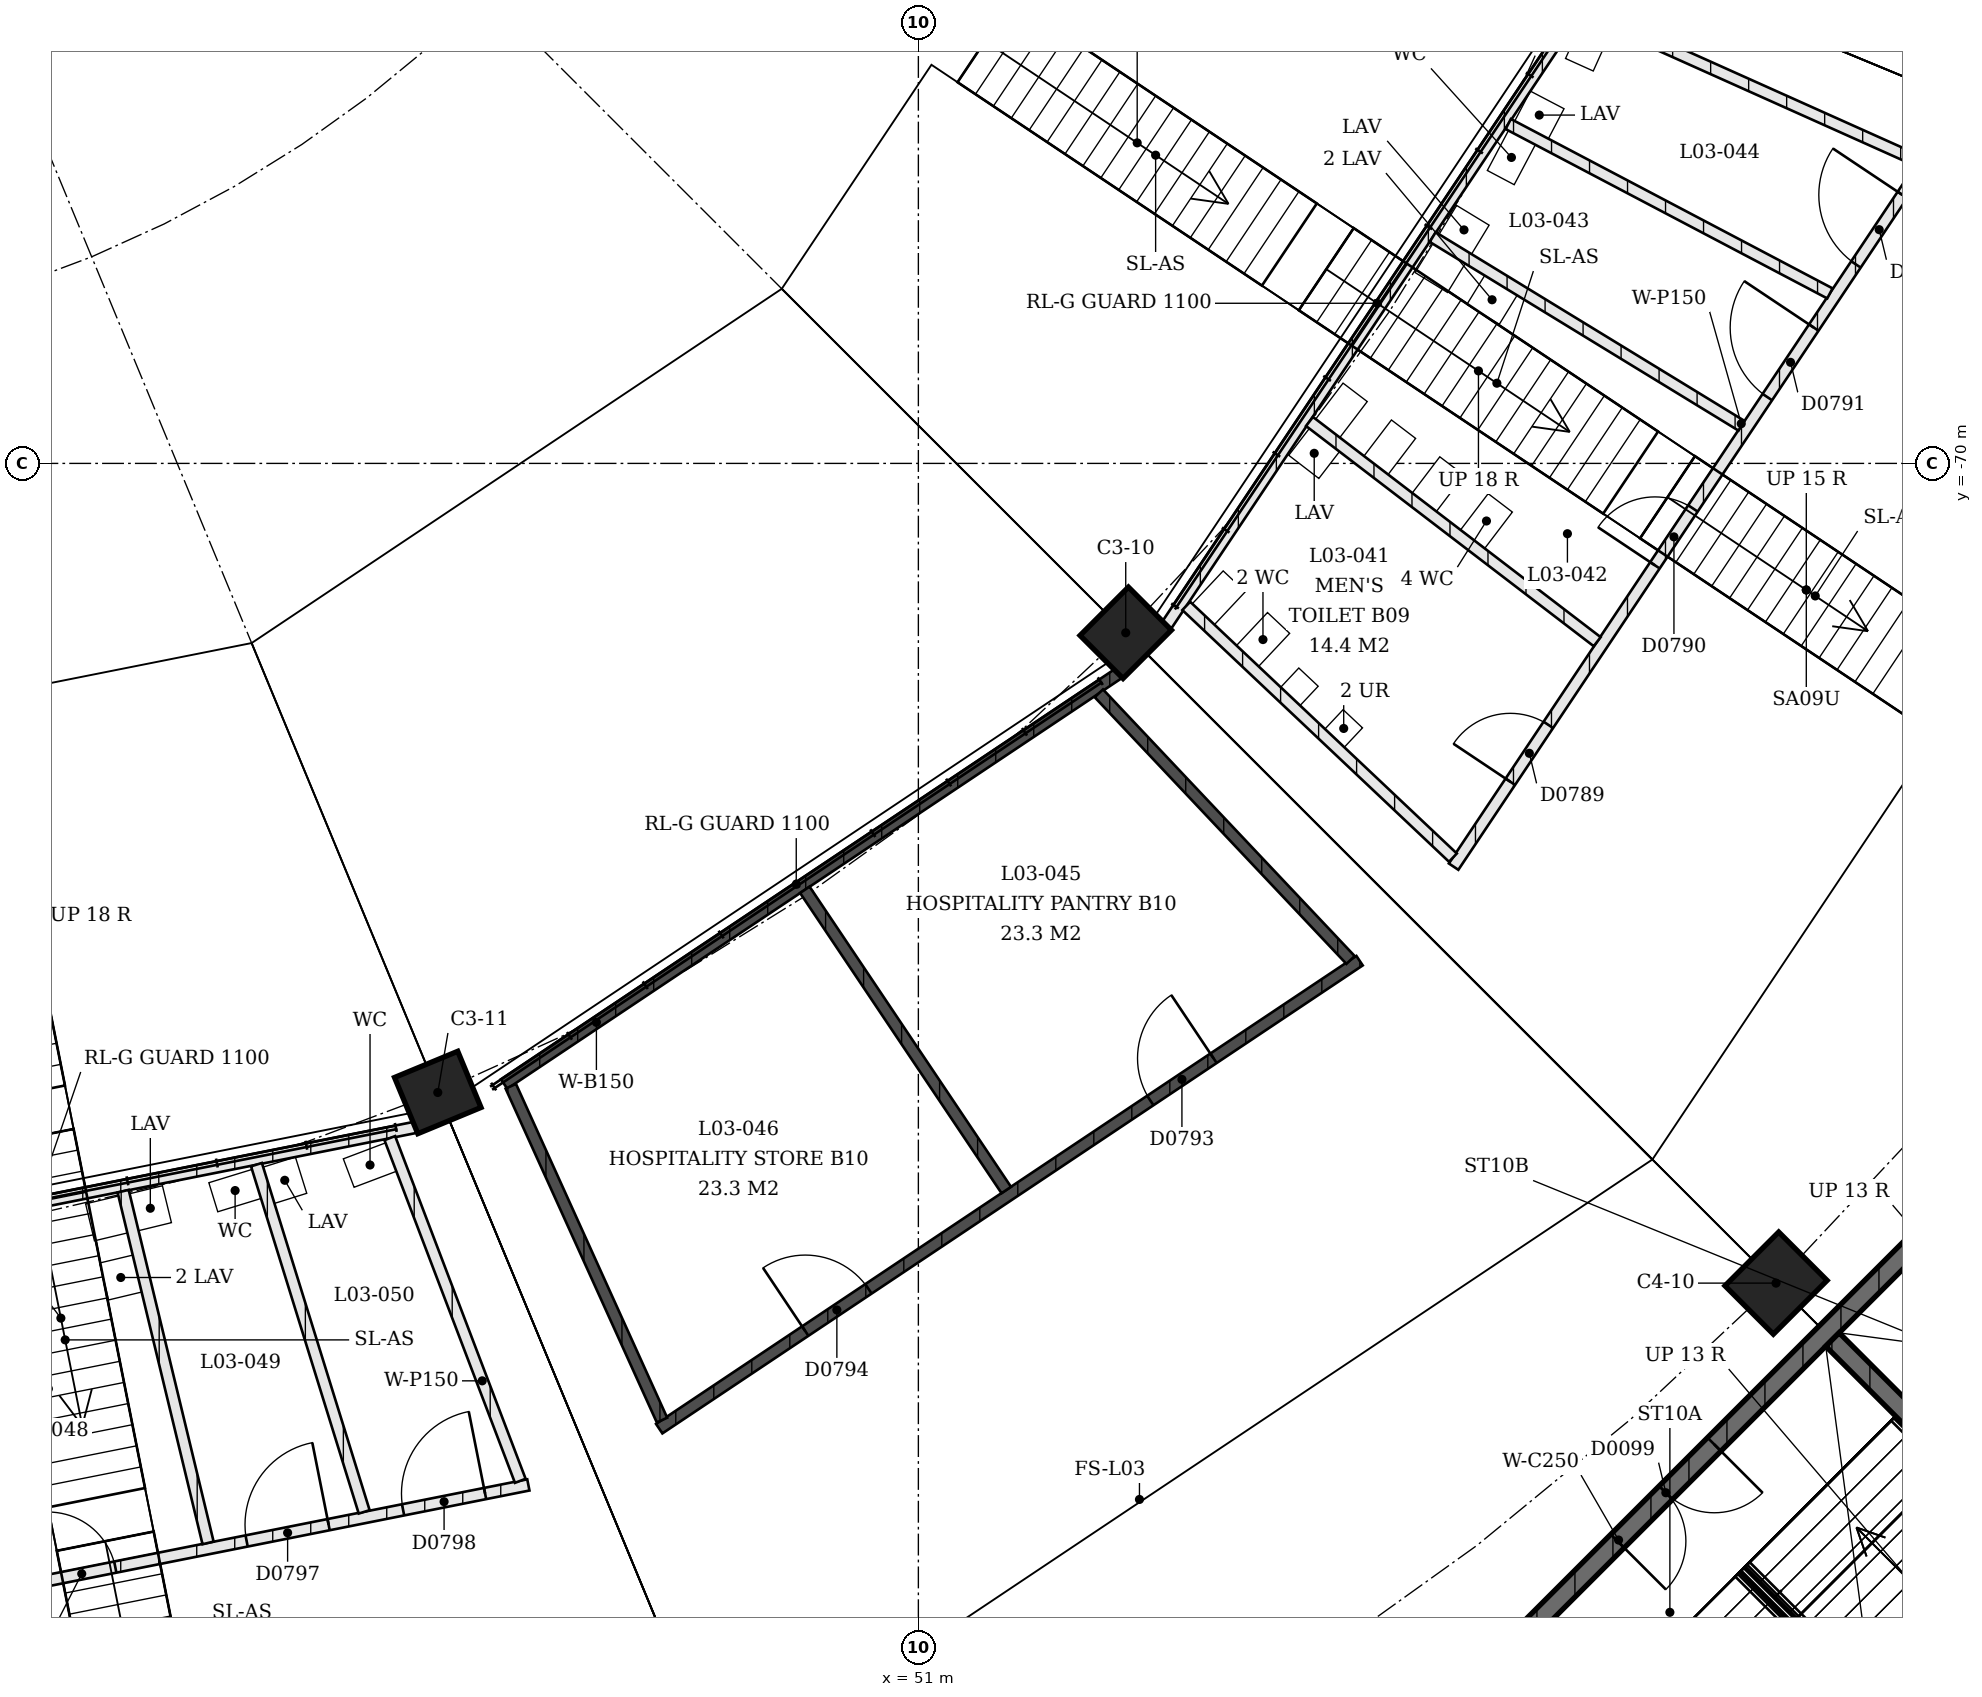
"""IFC4 building model, lengths in metres.
Left out: names, types, materials, properties, quantities, classifications, styles, units other than length and angle.
Written with IfcOpenShell. Run it as: python <this file> out.ifc"""

import sys

from ifc_helpers import new_model, si_unit, direction, frame, frame_2d, origin, origin_2d, place, context, subcontext, project, spatial, rectangle, extrude, element, fill, save


model = new_model("IFC4")
c1 = context("Model", 3, precision=1e-05, world=origin(), true_north=direction((0.0, 1.0)))
c2 = subcontext(c1, "Body", "Model", "MODEL_VIEW")
j1 = project(units=[si_unit("LENGTHUNIT", "METRE"), si_unit("PLANEANGLEUNIT", "RADIAN")], contexts=[c1])
p1 = place(None, origin())
s1 = spatial("IfcSite", under=j1, at=p1, CompositionType="ELEMENT")
p2 = place(p1, origin())
s2 = spatial("IfcBuilding", under=s1, at=p2, CompositionType="ELEMENT")
p3 = place(p2, frame((0.0, 0.0, 13.5)))
s3 = spatial("IfcBuildingStorey", under=s2, at=p3, CompositionType="ELEMENT", Elevation=13.5)
p4 = place(p3, frame((53.728, -72.228, 0.0), z_axis=(0.0, 0.0, 1.0), x_axis=(0.707106781187, 0.707106781187, 0.0)))
e1 = element("IfcColumn", 1, at=p4, inside=s3, PredefinedType="COLUMN", context=c2, shape_type="SweptSolid", body=[
    extrude(rectangle(XDim=0.9, YDim=0.8, at=origin_2d()), origin(), (0.0, 0.0, 1.0), 2.033),
])
p5 = place(p3, frame((62.284, -80.784, 0.0), z_axis=(0.0, 0.0, 1.0), x_axis=(0.707106781187, 0.707106781187, 0.0)))
e2 = element("IfcColumn", 2, at=p5, inside=s3, PredefinedType="COLUMN", context=c2, shape_type="SweptSolid", body=[
    extrude(rectangle(XDim=1.0, YDim=0.9, at=origin_2d()), origin(), (0.0, 0.0, 1.0), 4.5),
])
p6 = place(p3, frame((44.677, -78.276, 0.0), z_axis=(0.0, 0.0, 1.0), x_axis=(0.923879532511, 0.382683432365, 0.0)))
e3 = element("IfcColumn", 3, at=p6, inside=s3, PredefinedType="COLUMN", context=c2, shape_type="SweptSolid", body=[
    extrude(rectangle(XDim=0.9, YDim=0.8, at=origin_2d()), origin(), (0.0, 0.0, 1.0), 2.033),
])
p7 = place(p3, frame((58.643, -85.734, 0.0), z_axis=(0.0, 0.0, 1.0), x_axis=(0.707106781187, 0.707106781187, 0.0)))
e4 = element("IfcWall", 4, at=p7, inside=s3, PredefinedType="SHEAR", context=c2, shape_type="SweptSolid", body=[
    extrude(rectangle(XDim=12.15, YDim=0.25, at=frame_2d((6.075, 0.0))), origin(), (0.0, 0.0, 1.0), 4.09),
])
p8 = place(p7, frame((2.2, 0.0, 0.0)))
e5 = element("IfcOpeningElement", 5, at=p8, cuts=e4, PredefinedType="OPENING", context=c2, shape_type="SweptSolid", body=[
    extrude(rectangle(XDim=1.8, YDim=2.1, at=frame_2d((0.9, 1.05))), frame((0.0, 0.125, 0.0), z_axis=(0.0, -1.0, 0.0), x_axis=(1.0, 0.0, 0.0)), (0.0, 0.0, 1.0), 0.25),
])
p9 = place(p7, frame((8.15, 0.0, 0.0)))
e6 = element("IfcOpeningElement", 6, at=p9, cuts=e4, PredefinedType="OPENING", context=c2, shape_type="SweptSolid", body=[
    extrude(rectangle(XDim=1.8, YDim=2.1, at=frame_2d((0.9, 1.05))), frame((0.0, 0.125, 0.0), z_axis=(0.0, -1.0, 0.0), x_axis=(1.0, 0.0, 0.0)), (0.0, 0.0, 1.0), 0.25),
])
p10 = place(p3, frame((63.027, -81.527, 0.0), z_axis=(0.0, 0.0, 1.0), x_axis=(0.707106781187, -0.707106781187, 0.0)))
e7 = element("IfcWall", 7, at=p10, inside=s3, PredefinedType="SHEAR", context=c2, shape_type="SweptSolid", body=[
    extrude(rectangle(XDim=7.46, YDim=0.25, at=frame_2d((3.73, 0.0))), origin(), (0.0, 0.0, 1.0), 4.09),
])
p11 = place(p3, frame((54.266, -72.13, 0.0), z_axis=(0.0, 0.0, 1.0), x_axis=(0.555562437394, 0.83147482112, 0.0)))
e8 = element("IfcWall", 8, at=p11, inside=s3, PredefinedType="PARTITIONING", context=c2, shape_type="SweptSolid", body=[
    extrude(rectangle(XDim=10.125, YDim=0.15, at=frame_2d((5.062, 0.0))), origin(), (0.0, 0.0, 1.0), 3.0),
])
p12 = place(p3, frame((58.042, -75.305, 0.0), z_axis=(0.0, 0.0, 1.0), x_axis=(0.555569460176, 0.8314701287, 0.0)))
e9 = element("IfcWall", 9, at=p12, inside=s3, PredefinedType="PARTITIONING", context=c2, shape_type="SweptSolid", body=[
    extrude(rectangle(XDim=11.209, YDim=0.15, at=frame_2d((5.604, 0.0))), origin(), (0.0, 0.0, 1.0), 3.0),
])
p13 = place(p12, frame((1.343, 0.0, 0.0)))
e10 = element("IfcOpeningElement", 10, at=p13, cuts=e9, PredefinedType="OPENING", context=c2, shape_type="SweptSolid", body=[
    extrude(rectangle(XDim=0.9, YDim=2.1, at=frame_2d((0.45, 1.05))), frame((0.0, 0.075, 0.0), z_axis=(0.0, -1.0, 0.0), x_axis=(1.0, 0.0, 0.0)), (0.0, 0.0, 1.0), 0.15),
])
p14 = place(p12, frame((4.768, 0.0, 0.0)))
e11 = element("IfcOpeningElement", 11, at=p14, cuts=e9, PredefinedType="OPENING", context=c2, shape_type="SweptSolid", body=[
    extrude(rectangle(XDim=0.9, YDim=2.1, at=frame_2d((0.45, 1.05))), frame((0.0, 0.075, 0.0), z_axis=(0.0, -1.0, 0.0), x_axis=(1.0, 0.0, 0.0)), (0.0, 0.0, 1.0), 0.15),
])
p15 = place(p12, frame((7.43, 0.0, 0.0)))
e12 = element("IfcOpeningElement", 12, at=p15, cuts=e9, PredefinedType="OPENING", context=c2, shape_type="SweptSolid", body=[
    extrude(rectangle(XDim=1.1, YDim=2.1, at=frame_2d((0.55, 1.05))), frame((0.0, 0.075, 0.0), z_axis=(0.0, -1.0, 0.0), x_axis=(1.0, 0.0, 0.0)), (0.0, 0.0, 1.0), 0.15),
])
p16 = place(p12, frame((9.529, 0.0, 0.0)))
e13 = element("IfcOpeningElement", 13, at=p16, cuts=e9, PredefinedType="OPENING", context=c2, shape_type="SweptSolid", body=[
    extrude(rectangle(XDim=1.1, YDim=2.1, at=frame_2d((0.55, 1.05))), frame((0.0, 0.075, 0.0), z_axis=(0.0, -1.0, 0.0), x_axis=(1.0, 0.0, 0.0)), (0.0, 0.0, 1.0), 0.15),
])
p17 = place(p3, frame((54.525, -71.875, 0.0), z_axis=(0.0, 0.0, 1.0), x_axis=(0.727182951144, -0.686443701672, 0.0)))
e14 = element("IfcWall", 14, at=p17, inside=s3, PredefinedType="PARTITIONING", context=c2, shape_type="SweptSolid", body=[
    extrude(rectangle(XDim=4.824, YDim=0.15, at=frame_2d((2.412, 0.0))), origin(), (0.0, 0.0, 1.0), 3.0),
])
p18 = place(p3, frame((56.146, -69.448, 0.0), z_axis=(0.0, 0.0, 1.0), x_axis=(0.794129534094, -0.607748536057, 0.0)))
e15 = element("IfcWall", 15, at=p18, inside=s3, PredefinedType="PARTITIONING", context=c2, shape_type="SweptSolid", body=[
    extrude(rectangle(XDim=4.767, YDim=0.15, at=frame_2d((2.383, 0.0))), origin(), (0.0, 0.0, 1.0), 3.0),
])
p19 = place(p3, frame((57.767, -67.022, 0.0), z_axis=(0.0, 0.0, 1.0), x_axis=(0.853324930284, -0.521379481142, 0.0)))
e16 = element("IfcWall", 16, at=p19, inside=s3, PredefinedType="PARTITIONING", context=c2, shape_type="SweptSolid", body=[
    extrude(rectangle(XDim=4.761, YDim=0.15, at=frame_2d((2.38, 0.0))), origin(), (0.0, 0.0, 1.0), 3.0),
])
p20 = place(p3, frame((58.761, -65.535, 0.0), z_axis=(0.0, 0.0, 1.0), x_axis=(0.884880573932, -0.465817957874, 0.0)))
e17 = element("IfcWall", 17, at=p20, inside=s3, PredefinedType="PARTITIONING", context=c2, shape_type="SweptSolid", body=[
    extrude(rectangle(XDim=4.783, YDim=0.15, at=frame_2d((2.392, 0.0))), origin(), (0.0, 0.0, 1.0), 3.0),
])
p21 = place(p3, frame((59.754, -64.048, 0.0), z_axis=(0.0, 0.0, 1.0), x_axis=(0.912468935825, -0.409145990025, 0.0)))
e18 = element("IfcWall", 18, at=p21, inside=s3, PredefinedType="PARTITIONING", context=c2, shape_type="SweptSolid", body=[
    extrude(rectangle(XDim=4.824, YDim=0.15, at=frame_2d((2.412, 0.0))), origin(), (0.0, 0.0, 1.0), 3.0),
])
p22 = place(p3, frame((53.63, -72.766, 0.0), z_axis=(0.0, 0.0, 1.0), x_axis=(-0.831481684117, -0.555552165847, 0.0)))
e19 = element("IfcWall", 19, at=p22, inside=s3, PredefinedType="SOLIDWALL", context=c2, shape_type="SweptSolid", body=[
    extrude(rectangle(XDim=9.718, YDim=0.15, at=frame_2d((4.859, 0.0))), origin(), (0.0, 0.0, 1.0), 3.0),
])
p23 = place(p3, frame((56.805, -76.542, 0.0), z_axis=(0.0, 0.0, 1.0), x_axis=(-0.831470287315, -0.555569222791, 0.0)))
e20 = element("IfcWall", 20, at=p23, inside=s3, PredefinedType="SOLIDWALL", context=c2, shape_type="SweptSolid", body=[
    extrude(rectangle(XDim=11.082, YDim=0.15, at=frame_2d((5.541, 0.0))), origin(), (0.0, 0.0, 1.0), 3.0),
])
p24 = place(p23, frame((2.311, 0.0, 0.0)))
e21 = element("IfcOpeningElement", 21, at=p24, cuts=e20, PredefinedType="OPENING", context=c2, shape_type="SweptSolid", body=[
    extrude(rectangle(XDim=1.0, YDim=2.1, at=frame_2d((0.5, 1.05))), frame((0.0, 0.075, 0.0), z_axis=(0.0, -1.0, 0.0), x_axis=(1.0, 0.0, 0.0)), (0.0, 0.0, 1.0), 0.15),
])
p25 = place(p23, frame((7.771, 0.0, 0.0)))
e22 = element("IfcOpeningElement", 22, at=p25, cuts=e20, PredefinedType="OPENING", context=c2, shape_type="SweptSolid", body=[
    extrude(rectangle(XDim=1.0, YDim=2.1, at=frame_2d((0.5, 1.05))), frame((0.0, 0.075, 0.0), z_axis=(0.0, -1.0, 0.0), x_axis=(1.0, 0.0, 0.0)), (0.0, 0.0, 1.0), 0.15),
])
p26 = place(p3, frame((53.375, -73.025, 0.0), z_axis=(0.0, 0.0, 1.0), x_axis=(0.686443701672, -0.727182951144, 0.0)))
e23 = element("IfcWall", 23, at=p26, inside=s3, PredefinedType="SOLIDWALL", context=c2, shape_type="SweptSolid", body=[
    extrude(rectangle(XDim=4.824, YDim=0.15, at=frame_2d((2.412, 0.0))), origin(), (0.0, 0.0, 1.0), 3.0),
])
p27 = place(p3, frame((49.506, -75.61, 0.0), z_axis=(0.0, 0.0, 1.0), x_axis=(0.557185009832, -0.830388381915, 0.0)))
e24 = element("IfcWall", 24, at=p27, inside=s3, PredefinedType="SOLIDWALL", context=c2, shape_type="SweptSolid", body=[
    extrude(rectangle(XDim=4.757, YDim=0.15, at=frame_2d((2.378, 0.0))), origin(), (0.0, 0.0, 1.0), 3.0),
])
p28 = place(p3, frame((45.638, -78.195, 0.0), z_axis=(0.0, 0.0, 1.0), x_axis=(0.412593178732, -0.910915401596, 0.0)))
e25 = element("IfcWall", 25, at=p28, inside=s3, PredefinedType="SOLIDWALL", context=c2, shape_type="SweptSolid", body=[
    extrude(rectangle(XDim=4.821, YDim=0.15, at=frame_2d((2.411, 0.0))), origin(), (0.0, 0.0, 1.0), 3.0),
])
p29 = place(p3, frame((34.5, -80.7, 0.0), z_axis=(0.0, 0.0, 1.0), x_axis=(0.980787996346, 0.195076667554, 0.0)))
e26 = element("IfcWall", 26, at=p29, inside=s3, PredefinedType="PARTITIONING", context=c2, shape_type="SweptSolid", body=[
    extrude(rectangle(XDim=10.073, YDim=0.15, at=frame_2d((5.037, 0.0))), origin(), (0.0, 0.0, 1.0), 3.0),
])
p30 = place(p3, frame((34.875, -85.626, 0.0), z_axis=(0.0, 0.0, 1.0), x_axis=(0.980786208969, 0.195085653744, 0.0)))
e27 = element("IfcWall", 27, at=p30, inside=s3, PredefinedType="PARTITIONING", context=c2, shape_type="SweptSolid", body=[
    extrude(rectangle(XDim=11.209, YDim=0.15, at=frame_2d((5.604, 0.0))), origin(), (0.0, 0.0, 1.0), 3.0),
])
p31 = place(p30, frame((1.343, 0.0, 0.0)))
e28 = element("IfcOpeningElement", 28, at=p31, cuts=e27, PredefinedType="OPENING", context=c2, shape_type="SweptSolid", body=[
    extrude(rectangle(XDim=0.9, YDim=2.1, at=frame_2d((0.45, 1.05))), frame((0.0, 0.075, 0.0), z_axis=(0.0, -1.0, 0.0), x_axis=(1.0, 0.0, 0.0)), (0.0, 0.0, 1.0), 0.15),
])
p32 = place(p30, frame((4.768, 0.0, 0.0)))
e29 = element("IfcOpeningElement", 29, at=p32, cuts=e27, PredefinedType="OPENING", context=c2, shape_type="SweptSolid", body=[
    extrude(rectangle(XDim=0.9, YDim=2.1, at=frame_2d((0.45, 1.05))), frame((0.0, 0.075, 0.0), z_axis=(0.0, -1.0, 0.0), x_axis=(1.0, 0.0, 0.0)), (0.0, 0.0, 1.0), 0.15),
])
p33 = place(p30, frame((7.43, 0.0, 0.0)))
e30 = element("IfcOpeningElement", 30, at=p33, cuts=e27, PredefinedType="OPENING", context=c2, shape_type="SweptSolid", body=[
    extrude(rectangle(XDim=1.1, YDim=2.1, at=frame_2d((0.55, 1.05))), frame((0.0, 0.075, 0.0), z_axis=(0.0, -1.0, 0.0), x_axis=(1.0, 0.0, 0.0)), (0.0, 0.0, 1.0), 0.15),
])
p34 = place(p30, frame((9.529, 0.0, 0.0)))
e31 = element("IfcOpeningElement", 31, at=p34, cuts=e27, PredefinedType="OPENING", context=c2, shape_type="SweptSolid", body=[
    extrude(rectangle(XDim=1.1, YDim=2.1, at=frame_2d((0.55, 1.05))), frame((0.0, 0.075, 0.0), z_axis=(0.0, -1.0, 0.0), x_axis=(1.0, 0.0, 0.0)), (0.0, 0.0, 1.0), 0.15),
])
p35 = place(p3, frame((40.537, -79.575, 0.0), z_axis=(0.0, 0.0, 1.0), x_axis=(0.234720740692, -0.972062844619, 0.0)))
e32 = element("IfcWall", 32, at=p35, inside=s3, PredefinedType="PARTITIONING", context=c2, shape_type="SweptSolid", body=[
    extrude(rectangle(XDim=4.761, YDim=0.15, at=frame_2d((2.38, 0.0))), origin(), (0.0, 0.0, 1.0), 3.0),
])
p36 = place(p3, frame((42.291, -79.226, 0.0), z_axis=(0.0, 0.0, 1.0), x_axis=(0.296312515745, -0.955091039123, 0.0)))
e33 = element("IfcWall", 33, at=p36, inside=s3, PredefinedType="PARTITIONING", context=c2, shape_type="SweptSolid", body=[
    extrude(rectangle(XDim=4.783, YDim=0.15, at=frame_2d((2.392, 0.0))), origin(), (0.0, 0.0, 1.0), 3.0),
])
p37 = place(p3, frame((44.045, -78.877, 0.0), z_axis=(0.0, 0.0, 1.0), x_axis=(0.355921670207, -0.934515791561, 0.0)))
e34 = element("IfcWall", 34, at=p37, inside=s3, PredefinedType="PARTITIONING", context=c2, shape_type="SweptSolid", body=[
    extrude(rectangle(XDim=4.824, YDim=0.15, at=frame_2d((2.412, 0.0))), origin(), (0.0, 0.0, 1.0), 3.0),
])
p38 = place(p8, origin())
e35 = element("IfcDoor", 35, at=p38, inside=s3, OperationType="DOUBLE_DOOR_SINGLE_SWING", PredefinedType="DOOR", context=c2, shape_type="SweptSolid", body=[
    extrude(rectangle(XDim=1.8, YDim=2.1, at=frame_2d((0.9, 1.05))), frame((0.0, 0.025, 0.0), z_axis=(0.0, -1.0, 0.0), x_axis=(1.0, 0.0, 0.0)), (0.0, 0.0, 1.0), 0.05),
])
fill(e5, e35)
p39 = place(p13, origin())
e36 = element("IfcDoor", 36, at=p39, inside=s3, OperationType="SINGLE_SWING_RIGHT", PredefinedType="DOOR", context=c2, shape_type="SweptSolid", body=[
    extrude(rectangle(XDim=0.9, YDim=2.1, at=frame_2d((0.45, 1.05))), frame((0.0, 0.025, 0.0), z_axis=(0.0, -1.0, 0.0), x_axis=(1.0, 0.0, 0.0)), (0.0, 0.0, 1.0), 0.05),
])
fill(e10, e36)
p40 = place(p14, origin())
e37 = element("IfcDoor", 37, at=p40, inside=s3, OperationType="SINGLE_SWING_RIGHT", PredefinedType="DOOR", context=c2, shape_type="SweptSolid", body=[
    extrude(rectangle(XDim=0.9, YDim=2.1, at=frame_2d((0.45, 1.05))), frame((0.0, 0.025, 0.0), z_axis=(0.0, -1.0, 0.0), x_axis=(1.0, 0.0, 0.0)), (0.0, 0.0, 1.0), 0.05),
])
fill(e11, e37)
p41 = place(p15, origin())
e38 = element("IfcDoor", 38, at=p41, inside=s3, OperationType="SINGLE_SWING_LEFT", PredefinedType="DOOR", context=c2, shape_type="SweptSolid", body=[
    extrude(rectangle(XDim=1.1, YDim=2.1, at=frame_2d((0.55, 1.05))), frame((0.0, 0.025, 0.0), z_axis=(0.0, -1.0, 0.0), x_axis=(1.0, 0.0, 0.0)), (0.0, 0.0, 1.0), 0.05),
])
fill(e12, e38)
p42 = place(p16, origin())
e39 = element("IfcDoor", 39, at=p42, inside=s3, OperationType="SINGLE_SWING_LEFT", PredefinedType="DOOR", context=c2, shape_type="SweptSolid", body=[
    extrude(rectangle(XDim=1.1, YDim=2.1, at=frame_2d((0.55, 1.05))), frame((0.0, 0.025, 0.0), z_axis=(0.0, -1.0, 0.0), x_axis=(1.0, 0.0, 0.0)), (0.0, 0.0, 1.0), 0.05),
])
fill(e13, e39)
p43 = place(p24, origin())
e40 = element("IfcDoor", 40, at=p43, inside=s3, OperationType="SINGLE_SWING_LEFT", PredefinedType="DOOR", context=c2, shape_type="SweptSolid", body=[
    extrude(rectangle(XDim=1.0, YDim=2.1, at=frame_2d((0.5, 1.05))), frame((0.0, 0.025, 0.0), z_axis=(0.0, -1.0, 0.0), x_axis=(1.0, 0.0, 0.0)), (0.0, 0.0, 1.0), 0.05),
])
fill(e21, e40)
p44 = place(p25, origin())
e41 = element("IfcDoor", 41, at=p44, inside=s3, OperationType="SINGLE_SWING_RIGHT", PredefinedType="DOOR", context=c2, shape_type="SweptSolid", body=[
    extrude(rectangle(XDim=1.0, YDim=2.1, at=frame_2d((0.5, 1.05))), frame((0.0, 0.025, 0.0), z_axis=(0.0, -1.0, 0.0), x_axis=(1.0, 0.0, 0.0)), (0.0, 0.0, 1.0), 0.05),
])
fill(e22, e41)
p45 = place(p32, origin())
e42 = element("IfcDoor", 42, at=p45, inside=s3, OperationType="SINGLE_SWING_RIGHT", PredefinedType="DOOR", context=c2, shape_type="SweptSolid", body=[
    extrude(rectangle(XDim=0.9, YDim=2.1, at=frame_2d((0.45, 1.05))), frame((0.0, 0.025, 0.0), z_axis=(0.0, -1.0, 0.0), x_axis=(1.0, 0.0, 0.0)), (0.0, 0.0, 1.0), 0.05),
])
fill(e29, e42)
p46 = place(p33, origin())
e43 = element("IfcDoor", 43, at=p46, inside=s3, OperationType="SINGLE_SWING_LEFT", PredefinedType="DOOR", context=c2, shape_type="SweptSolid", body=[
    extrude(rectangle(XDim=1.1, YDim=2.1, at=frame_2d((0.55, 1.05))), frame((0.0, 0.025, 0.0), z_axis=(0.0, -1.0, 0.0), x_axis=(1.0, 0.0, 0.0)), (0.0, 0.0, 1.0), 0.05),
])
fill(e30, e43)
p47 = place(p34, origin())
e44 = element("IfcDoor", 44, at=p47, inside=s3, OperationType="SINGLE_SWING_LEFT", PredefinedType="DOOR", context=c2, shape_type="SweptSolid", body=[
    extrude(rectangle(XDim=1.1, YDim=2.1, at=frame_2d((0.55, 1.05))), frame((0.0, 0.025, 0.0), z_axis=(0.0, -1.0, 0.0), x_axis=(1.0, 0.0, 0.0)), (0.0, 0.0, 1.0), 0.05),
])
fill(e31, e44)
save(model, sys.argv[1])
